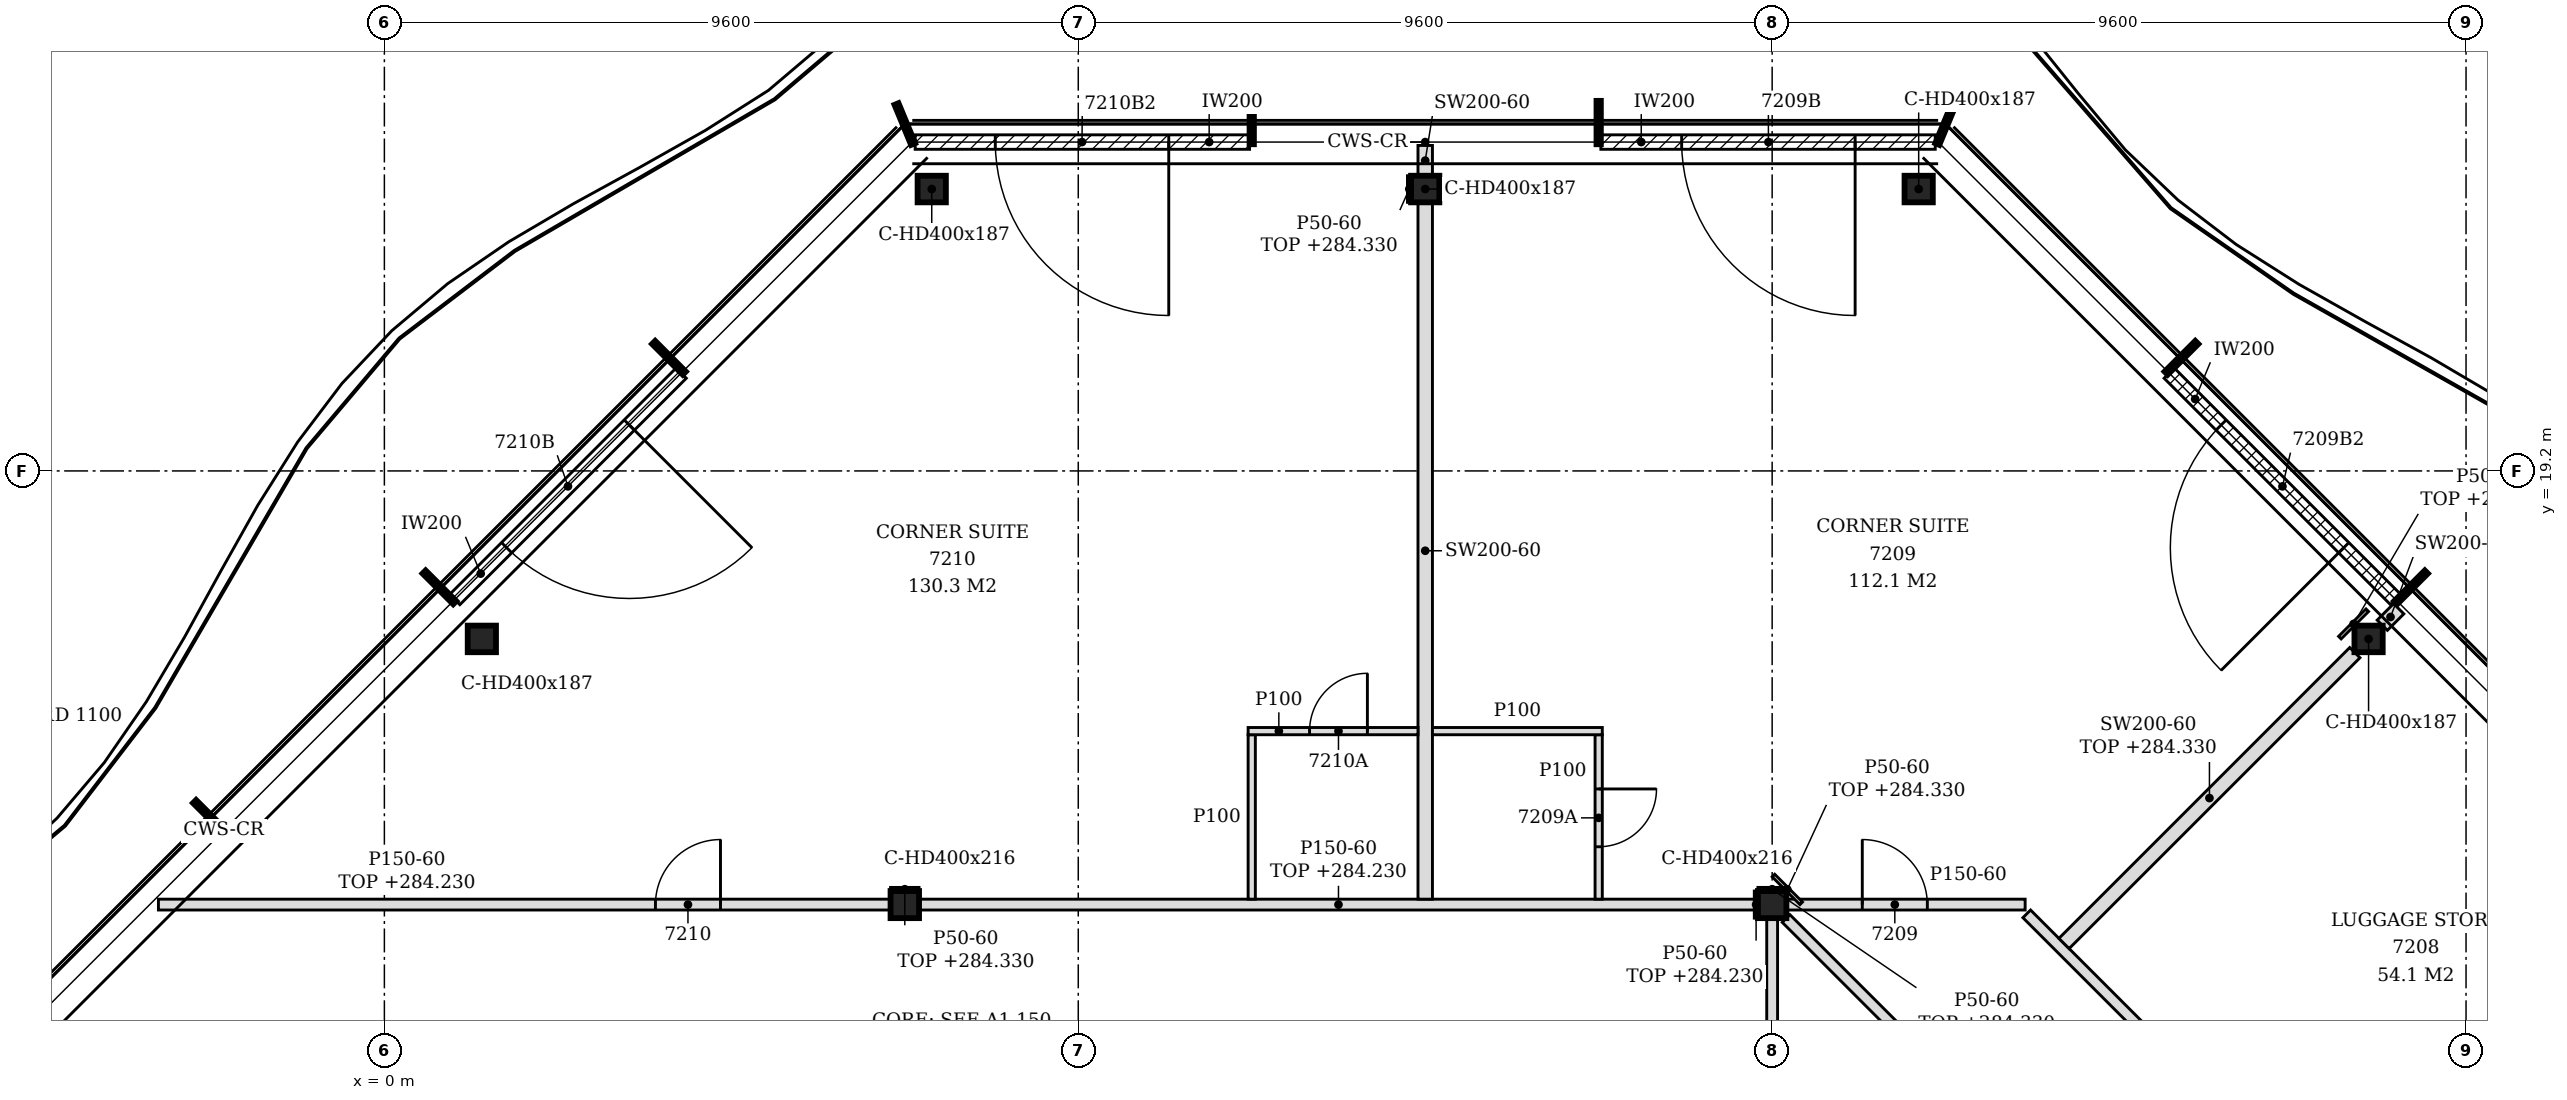
"""IFC4 building model, lengths in metres.
Left out: names, types, materials, properties, quantities, classifications, styles, units other than length and angle.
Written with IfcOpenShell. Run it as: python <this file> out.ifc"""

import sys

from ifc_helpers import new_model, si_unit, direction, frame, frame_2d, origin, origin_2d, place, context, subcontext, project, spatial, polyline, rectangle, i_section, outline, extrude, element, fill, save


model = new_model("IFC4")
c1 = context("Model", 3, precision=1e-05, world=origin(), true_north=direction((0.0, 1.0)))
c2 = subcontext(c1, "Body", "Model", "MODEL_VIEW")
j1 = project(units=[si_unit("LENGTHUNIT", "METRE"), si_unit("PLANEANGLEUNIT", "RADIAN")], contexts=[c1])
p1 = place(None, origin())
s1 = spatial("IfcSite", under=j1, at=p1, CompositionType="ELEMENT")
p2 = place(p1, origin())
s2 = spatial("IfcBuilding", under=s1, at=p2, CompositionType="ELEMENT")
p3 = place(p2, frame((0.0, 0.0, 281.4)))
s3 = spatial("IfcBuildingStorey", under=s2, at=p3, CompositionType="ELEMENT", Elevation=281.4)
for number, where, z_axis, x_axis in (
    (1, (27.451, 16.876, -0.15), (0.0, 0.0, 1.0), (1.0, 0.0, 0.0)),
    (2, (21.227, 23.1, -0.15), (0.0, 0.0, 1.0), (1.0, 0.0, 0.0)),
    (3, (14.4, 23.1, -0.15), (0.0, 0.0, 1.0), (1.0, 0.0, 0.0)),
    (4, (7.573, 23.1, -0.15), (0.0, 0.0, 1.0), (1.0, 0.0, 0.0)),
    (5, (1.348, 16.876, -0.15), (0.0, 0.0, 1.0), (1.0, 0.0, 0.0)),
):
    element("IfcColumn", number, at=place(p3, frame(where, z_axis=z_axis, x_axis=x_axis)), inside=s3, PredefinedType="COLUMN", context=c2, shape_type="SweptSolid", body=[
        extrude(i_section(OverallWidth=0.391, OverallDepth=0.368, WebThickness=0.015, FlangeThickness=0.024, FilletRadius=0.015, at=origin_2d()), origin(), (0.0, 0.0, 1.0), 3.6),
    ])
for number, where, z_axis, x_axis in (
    (6, (7.2, 13.2, -0.15), (0.0, 0.0, 1.0), (1.0, 0.0, 0.0)),
    (7, (19.2, 13.2, -0.15), (0.0, 0.0, 1.0), (1.0, 0.0, 0.0)),
):
    element("IfcColumn", number, at=place(p3, frame(where, z_axis=z_axis, x_axis=x_axis)), inside=s3, PredefinedType="COLUMN", context=c2, shape_type="SweptSolid", body=[
        extrude(i_section(OverallWidth=0.394, OverallDepth=0.375, WebThickness=0.017, FlangeThickness=0.028, FilletRadius=0.015, at=origin_2d()), origin(), (0.0, 0.0, 1.0), 3.6),
    ])
p4 = place(p3, frame((27.826, 17.42, 0.0), z_axis=(0.0, 0.0, 1.0), x_axis=(-0.707079231393, 0.707134329907, 0.0)))
e8 = element("IfcWall", 8, at=p4, inside=s3, PredefinedType="NOTDEFINED", context=c2, shape_type="SweptSolid", body=[
    extrude(rectangle(XDim=4.431, YDim=0.2, at=frame_2d((2.215, 0.0))), origin(), (0.0, 0.0, 1.0), 3.45),
])
p5 = place(p4, frame((1.015, 0.0, 0.0)))
e9 = element("IfcOpeningElement", 9, at=p5, cuts=e8, PredefinedType="OPENING", context=c2, shape_type="SweptSolid", body=[
    extrude(rectangle(XDim=2.4, YDim=2.4, at=frame_2d((1.2, 1.2))), frame((0.0, 0.11, 0.0), z_axis=(0.0, -1.0, 0.0), x_axis=(1.0, 0.0, 0.0)), (0.0, 0.0, 1.0), 0.22),
])
p6 = place(p3, frame((21.457, 23.75, 0.0), z_axis=(0.0, 0.0, 1.0), x_axis=(-1.0, 0.0, 0.0)))
e10 = element("IfcWall", 10, at=p6, inside=s3, PredefinedType="NOTDEFINED", context=c2, shape_type="SweptSolid", body=[
    extrude(rectangle(XDim=4.626, YDim=0.2, at=frame_2d((2.313, 0.0))), origin(), (0.0, 0.0, 1.0), 3.45),
])
p7 = place(p6, frame((1.108, 0.0, 0.0)))
e11 = element("IfcOpeningElement", 11, at=p7, cuts=e10, PredefinedType="OPENING", context=c2, shape_type="SweptSolid", body=[
    extrude(rectangle(XDim=2.4, YDim=2.4, at=frame_2d((1.2, 1.2))), frame((0.0, 0.11, 0.0), z_axis=(0.0, -1.0, 0.0), x_axis=(1.0, 0.0, 0.0)), (0.0, 0.0, 1.0), 0.22),
])
p8 = place(p3, frame((11.97, 23.75, 0.0), z_axis=(0.0, 0.0, 1.0), x_axis=(-1.0, 0.0, 0.0)))
e12 = element("IfcWall", 12, at=p8, inside=s3, PredefinedType="NOTDEFINED", context=c2, shape_type="SweptSolid", body=[
    extrude(rectangle(XDim=4.626, YDim=0.2, at=frame_2d((2.313, 0.0))), origin(), (0.0, 0.0, 1.0), 3.45),
])
p9 = place(p8, frame((1.118, 0.0, 0.0)))
e13 = element("IfcOpeningElement", 13, at=p9, cuts=e12, PredefinedType="OPENING", context=c2, shape_type="SweptSolid", body=[
    extrude(rectangle(XDim=2.4, YDim=2.4, at=frame_2d((1.2, 1.2))), frame((0.0, 0.11, 0.0), z_axis=(0.0, -1.0, 0.0), x_axis=(1.0, 0.0, 0.0)), (0.0, 0.0, 1.0), 0.22),
])
p10 = place(p3, frame((4.107, 20.553, 0.0), z_axis=(0.0, 0.0, 1.0), x_axis=(-0.707079231393, -0.707134329907, 0.0)))
e14 = element("IfcWall", 14, at=p10, inside=s3, PredefinedType="NOTDEFINED", context=c2, shape_type="SweptSolid", body=[
    extrude(rectangle(XDim=4.431, YDim=0.2, at=frame_2d((2.215, 0.0))), origin(), (0.0, 0.0, 1.0), 3.45),
])
p11 = place(p10, frame((1.015, 0.0, 0.0)))
e15 = element("IfcOpeningElement", 15, at=p11, cuts=e14, PredefinedType="OPENING", context=c2, shape_type="SweptSolid", body=[
    extrude(rectangle(XDim=2.4, YDim=2.4, at=frame_2d((1.2, 1.2))), frame((0.0, 0.11, 0.0), z_axis=(0.0, -1.0, 0.0), x_axis=(1.0, 0.0, 0.0)), (0.0, 0.0, 1.0), 0.22),
])
p12 = place(p3, frame((33.359, 2.435, 0.0), z_axis=(0.0, 0.0, 1.0), x_axis=(-0.707098666068, 0.707114896212, 0.0)))
e16 = element("IfcWall", 16, at=p12, inside=s3, PredefinedType="PARTITIONING", context=c2, shape_type="SweptSolid", body=[
    extrude(rectangle(XDim=15.042, YDim=0.15, at=frame_2d((7.521, 0.0))), origin(), (0.0, 0.0, 1.0), 2.88),
])
p13 = place(p12, frame((4.021, 0.0, 0.0)))
e17 = element("IfcOpeningElement", 17, at=p13, cuts=e16, PredefinedType="OPENING", context=c2, shape_type="SweptSolid", body=[
    extrude(rectangle(XDim=0.9, YDim=2.1, at=frame_2d((0.45, 1.05))), frame((0.0, 0.085, 0.0), z_axis=(0.0, -1.0, 0.0), x_axis=(1.0, 0.0, 0.0)), (0.0, 0.0, 1.0), 0.17),
])
p14 = place(p12, frame((10.04, 0.0, 0.0)))
e18 = element("IfcOpeningElement", 18, at=p14, cuts=e16, PredefinedType="OPENING", context=c2, shape_type="SweptSolid", body=[
    extrude(rectangle(XDim=0.9, YDim=2.1, at=frame_2d((0.45, 1.05))), frame((0.0, 0.085, 0.0), z_axis=(0.0, -1.0, 0.0), x_axis=(1.0, 0.0, 0.0)), (0.0, 0.0, 1.0), 0.17),
])
p15 = place(p3, frame((19.2, 3.675, 0.0), z_axis=(0.0, 0.0, 1.0), x_axis=(0.0, 1.0, 0.0)))
e19 = element("IfcWall", 19, at=p15, inside=s3, PredefinedType="PARTITIONING", context=c2, shape_type="SweptSolid", body=[
    extrude(rectangle(XDim=9.337, YDim=0.15, at=frame_2d((4.669, 0.0))), origin(), (0.0, 0.0, 1.0), 2.83),
])
p16 = place(p3, frame((28.672, 3.728, 0.0), z_axis=(0.0, 0.0, 1.0), x_axis=(-0.707106781187, 0.707106781187, 0.0)))
e20 = element("IfcWall", 20, at=p16, inside=s3, PredefinedType="PARTITIONING", context=c2, shape_type="SweptSolid", body=[
    extrude(rectangle(XDim=13.124, YDim=0.15, at=frame_2d((6.562, 0.0))), origin(), (0.0, 0.0, 1.0), 2.88),
])
p17 = place(p16, frame((6.157, 0.0, 0.0)))
e21 = element("IfcOpeningElement", 21, at=p17, cuts=e20, PredefinedType="OPENING", context=c2, shape_type="SweptSolid", body=[
    extrude(rectangle(XDim=0.9, YDim=2.1, at=frame_2d((0.45, 1.05))), frame((0.0, 0.085, 0.0), z_axis=(0.0, -1.0, 0.0), x_axis=(1.0, 0.0, 0.0)), (0.0, 0.0, 1.0), 0.17),
])
p18 = place(p3, frame((23.238, 12.662, 0.0), z_axis=(0.0, 0.0, 1.0), x_axis=(0.707106781187, 0.707106781187, 0.0)))
e22 = element("IfcWall", 22, at=p18, inside=s3, PredefinedType="PARTITIONING", context=c2, shape_type="SweptSolid", body=[
    extrude(rectangle(XDim=5.69, YDim=0.2, at=frame_2d((2.845, 0.0))), origin(), (0.0, 0.0, 1.0), 2.93),
])
p19 = place(p3, frame((-3.126, 13.2, 0.0), z_axis=(0.0, 0.0, 1.0), x_axis=(1.0, 0.0, 0.0)))
e23 = element("IfcWall", 23, at=p19, inside=s3, PredefinedType="PARTITIONING", context=c2, shape_type="SweptSolid", body=[
    extrude(outline(polyline([(0.0, 0.0), (10.129, 0.0), (10.129, 2.83), (1.369, 2.83), (1.367, 2.63), (0.229, 2.63), (0.227, 2.83), (0.0, 2.83), (0.0, 0.0)])), frame((0.0, 0.075, 0.0), z_axis=(0.0, -1.0, 0.0), x_axis=(1.0, 0.0, 0.0)), (0.0, 0.0, 1.0), 0.15),
])
p20 = place(p19, frame((6.876, 0.0, 0.0)))
e24 = element("IfcOpeningElement", 24, at=p20, cuts=e23, PredefinedType="OPENING", context=c2, shape_type="SweptSolid", body=[
    extrude(rectangle(XDim=0.9, YDim=2.1, at=frame_2d((0.45, 1.05))), frame((0.0, 0.085, 0.0), z_axis=(0.0, -1.0, 0.0), x_axis=(1.0, 0.0, 0.0)), (0.0, 0.0, 1.0), 0.17),
])
p21 = place(p3, frame((7.397, 13.2, 0.0), z_axis=(0.0, 0.0, 1.0), x_axis=(1.0, 0.0, 0.0)))
e25 = element("IfcWall", 25, at=p21, inside=s3, PredefinedType="PARTITIONING", context=c2, shape_type="SweptSolid", body=[
    extrude(rectangle(XDim=11.606, YDim=0.15, at=frame_2d((5.803, 0.0))), origin(), (0.0, 0.0, 1.0), 2.83),
])
p22 = place(p3, frame((19.397, 13.2, 0.0), z_axis=(0.0, 0.0, 1.0), x_axis=(1.0, 0.0, 0.0)))
e26 = element("IfcWall", 26, at=p22, inside=s3, PredefinedType="PARTITIONING", context=c2, shape_type="SweptSolid", body=[
    extrude(rectangle(XDim=3.303, YDim=0.15, at=frame_2d((1.652, 0.0))), origin(), (0.0, 0.0, 1.0), 3.45),
])
p23 = place(p22, frame((1.05, 0.0, 0.0)))
e27 = element("IfcOpeningElement", 27, at=p23, cuts=e26, PredefinedType="OPENING", context=c2, shape_type="SweptSolid", body=[
    extrude(rectangle(XDim=0.9, YDim=2.1, at=frame_2d((0.45, 1.05))), frame((0.0, 0.085, 0.0), z_axis=(0.0, -1.0, 0.0), x_axis=(1.0, 0.0, 0.0)), (0.0, 0.0, 1.0), 0.17),
])
p24 = place(p3, frame((12.0, 13.275, 0.0), z_axis=(0.0, 0.0, 1.0), x_axis=(0.0, 1.0, 0.0)))
e28 = element("IfcWall", 28, at=p24, inside=s3, PredefinedType="PARTITIONING", context=c2, shape_type="SweptSolid", body=[
    extrude(outline(polyline([(0.0, 0.0), (2.275, 0.0), (2.275, 3.45), (0.075, 3.45), (0.073, 2.83), (0.0, 2.83), (0.0, 0.0)])), frame((0.0, 0.05, 0.0), z_axis=(0.0, -1.0, 0.0), x_axis=(1.0, 0.0, 0.0)), (0.0, 0.0, 1.0), 0.1),
])
p25 = place(p3, frame((14.4, 13.275, 0.0), z_axis=(0.0, 0.0, 1.0), x_axis=(0.0, 1.0, 0.0)))
e29 = element("IfcWall", 29, at=p25, inside=s3, PredefinedType="PARTITIONING", context=c2, shape_type="SweptSolid", body=[
    extrude(outline(polyline([(0.0, 0.0), (9.641, 0.0), (9.641, 3.45), (6.03, 3.45), (6.028, 2.88), (5.82, 2.88), (5.818, 3.45), (0.075, 3.45), (0.073, 2.83), (0.0, 2.83), (0.0, 0.0)])), frame((0.0, 0.1, 0.0), z_axis=(0.0, -1.0, 0.0), x_axis=(1.0, 0.0, 0.0)), (0.0, 0.0, 1.0), 0.2),
])
p26 = place(p3, frame((16.8, 13.275, 0.0), z_axis=(0.0, 0.0, 1.0), x_axis=(0.0, 1.0, 0.0)))
e30 = element("IfcWall", 30, at=p26, inside=s3, PredefinedType="PARTITIONING", context=c2, shape_type="SweptSolid", body=[
    extrude(outline(polyline([(0.0, 0.0), (2.275, 0.0), (2.275, 3.45), (0.075, 3.45), (0.073, 2.83), (0.0, 2.83), (0.0, 0.0)])), frame((0.0, 0.05, 0.0), z_axis=(0.0, -1.0, 0.0), x_axis=(1.0, 0.0, 0.0)), (0.0, 0.0, 1.0), 0.1),
])
p27 = place(p26, frame((0.725, 0.0, 0.0)))
e31 = element("IfcOpeningElement", 31, at=p27, cuts=e30, PredefinedType="OPENING", context=c2, shape_type="SweptSolid", body=[
    extrude(rectangle(XDim=0.8, YDim=2.1, at=frame_2d((0.4, 1.05))), frame((0.0, 0.06, 0.0), z_axis=(0.0, -1.0, 0.0), x_axis=(1.0, 0.0, 0.0)), (0.0, 0.0, 1.0), 0.12),
])
p28 = place(p3, frame((11.95, 15.6, 0.0), z_axis=(0.0, 0.0, 1.0), x_axis=(1.0, 0.0, 0.0)))
e32 = element("IfcWall", 32, at=p28, inside=s3, PredefinedType="PARTITIONING", context=c2, shape_type="SweptSolid", body=[
    extrude(rectangle(XDim=2.35, YDim=0.1, at=frame_2d((1.175, 0.0))), origin(), (0.0, 0.0, 1.0), 3.45),
])
p29 = place(p28, frame((0.85, 0.0, 0.0)))
e33 = element("IfcOpeningElement", 33, at=p29, cuts=e32, PredefinedType="OPENING", context=c2, shape_type="SweptSolid", body=[
    extrude(rectangle(XDim=0.8, YDim=2.1, at=frame_2d((0.4, 1.05))), frame((0.0, 0.06, 0.0), z_axis=(0.0, -1.0, 0.0), x_axis=(1.0, 0.0, 0.0)), (0.0, 0.0, 1.0), 0.12),
])
p30 = place(p3, frame((14.5, 15.6, 0.0), z_axis=(0.0, 0.0, 1.0), x_axis=(1.0, 0.0, 0.0)))
e34 = element("IfcWall", 34, at=p30, inside=s3, PredefinedType="PARTITIONING", context=c2, shape_type="SweptSolid", body=[
    extrude(rectangle(XDim=2.35, YDim=0.1, at=frame_2d((1.175, 0.0))), origin(), (0.0, 0.0, 1.0), 3.45),
])
p31 = place(p3, frame((27.641, 17.065, 0.0), z_axis=(0.0, 0.0, 1.0), x_axis=(0.707106781187, 0.707106781187, 0.0)))
e35 = element("IfcWall", 35, at=p31, inside=s3, PredefinedType="PARTITIONING", context=c2, shape_type="SweptSolid", body=[
    extrude(rectangle(XDim=0.322, YDim=0.2, at=frame_2d((0.161, 0.0))), origin(), (0.0, 0.0, 1.0), 3.45),
])
p32 = place(p3, frame((14.4, 23.284, 0.0), z_axis=(0.0, 0.0, 1.0), x_axis=(0.0, 1.0, 0.0)))
e36 = element("IfcWall", 36, at=p32, inside=s3, PredefinedType="PARTITIONING", context=c2, shape_type="SweptSolid", body=[
    extrude(rectangle(XDim=0.419, YDim=0.2, at=frame_2d((0.209, 0.0))), origin(), (0.0, 0.0, 1.0), 3.45),
])
p33 = place(p3, frame((18.978, 13.012, 0.0), z_axis=(0.0, 0.0, 1.0), x_axis=(0.0, 1.0, 0.0)))
e37 = element("IfcWall", 37, at=p33, inside=s3, PredefinedType="PARTITIONING", context=c2, shape_type="SweptSolid", body=[
    extrude(rectangle(XDim=0.375, YDim=0.05, at=frame_2d((0.188, 0.0))), origin(), (0.0, 0.0, 1.0), 2.83),
])
p34 = place(p3, frame((19.602, 13.218, 0.0), z_axis=(0.0, 0.0, 1.0), x_axis=(-0.707106781187, 0.707106781187, 0.0)))
e38 = element("IfcWall", 38, at=p34, inside=s3, PredefinedType="PARTITIONING", context=c2, shape_type="SweptSolid", body=[
    extrude(rectangle(XDim=0.544, YDim=0.05, at=frame_2d((0.272, 0.0))), origin(), (0.0, 0.0, 1.0), 2.93),
])
p35 = place(p3, frame((27.054, 16.893, 0.0), z_axis=(0.0, 0.0, 1.0), x_axis=(0.707106781187, 0.707106781187, 0.0)))
e39 = element("IfcWall", 39, at=p35, inside=s3, PredefinedType="PARTITIONING", context=c2, shape_type="SweptSolid", body=[
    extrude(rectangle(XDim=0.537, YDim=0.05, at=frame_2d((0.269, 0.0))), origin(), (0.0, 0.0, 1.0), 2.93),
])
for number, where, z_axis, x_axis in (
    (40, (7.003, 13.413, 0.0), (0.0, 0.0, 1.0), (1.0, 0.0, 0.0)),
    (41, (19.003, 13.413, 0.0), (0.0, 0.0, 1.0), (1.0, 0.0, 0.0)),
):
    element("IfcWall", number, at=place(p3, frame(where, z_axis=z_axis, x_axis=x_axis)), inside=s3, PredefinedType="PARTITIONING", context=c2, shape_type="SweptSolid", body=[
        extrude(rectangle(XDim=0.394, YDim=0.05, at=frame_2d((0.197, 0.0))), origin(), (0.0, 0.0, 1.0), 2.93),
    ])
p36 = place(p3, frame((14.179, 22.916, 0.0), z_axis=(0.0, 0.0, 1.0), x_axis=(0.0, 1.0, 0.0)))
e42 = element("IfcWall", 42, at=p36, inside=s3, PredefinedType="PARTITIONING", context=c2, shape_type="SweptSolid", body=[
    extrude(rectangle(XDim=0.368, YDim=0.05, at=frame_2d((0.184, 0.0))), origin(), (0.0, 0.0, 1.0), 2.93),
])
p37 = place(p5, origin())
e43 = element("IfcDoor", 43, at=p37, inside=s3, OperationType="SINGLE_SWING_LEFT", PredefinedType="DOOR", context=c2, shape_type="SweptSolid", body=[
    extrude(rectangle(XDim=2.4, YDim=2.4, at=frame_2d((1.2, 1.2))), frame((0.0, 0.025, 0.0), z_axis=(0.0, -1.0, 0.0), x_axis=(1.0, 0.0, 0.0)), (0.0, 0.0, 1.0), 0.05),
])
fill(e9, e43)
p38 = place(p7, origin())
e44 = element("IfcDoor", 44, at=p38, inside=s3, OperationType="SINGLE_SWING_LEFT", PredefinedType="DOOR", context=c2, shape_type="SweptSolid", body=[
    extrude(rectangle(XDim=2.4, YDim=2.4, at=frame_2d((1.2, 1.2))), frame((0.0, 0.025, 0.0), z_axis=(0.0, -1.0, 0.0), x_axis=(1.0, 0.0, 0.0)), (0.0, 0.0, 1.0), 0.05),
])
fill(e11, e44)
p39 = place(p9, origin())
e45 = element("IfcDoor", 45, at=p39, inside=s3, OperationType="SINGLE_SWING_LEFT", PredefinedType="DOOR", context=c2, shape_type="SweptSolid", body=[
    extrude(rectangle(XDim=2.4, YDim=2.4, at=frame_2d((1.2, 1.2))), frame((0.0, 0.025, 0.0), z_axis=(0.0, -1.0, 0.0), x_axis=(1.0, 0.0, 0.0)), (0.0, 0.0, 1.0), 0.05),
])
fill(e13, e45)
p40 = place(p11, origin())
e46 = element("IfcDoor", 46, at=p40, inside=s3, OperationType="SINGLE_SWING_LEFT", PredefinedType="DOOR", context=c2, shape_type="SweptSolid", body=[
    extrude(rectangle(XDim=2.4, YDim=2.4, at=frame_2d((1.2, 1.2))), frame((0.0, 0.025, 0.0), z_axis=(0.0, -1.0, 0.0), x_axis=(1.0, 0.0, 0.0)), (0.0, 0.0, 1.0), 0.05),
])
fill(e15, e46)
p41 = place(p23, origin())
e47 = element("IfcDoor", 47, at=p41, inside=s3, OperationType="SINGLE_SWING_LEFT", PredefinedType="DOOR", context=c2, shape_type="SweptSolid", body=[
    extrude(rectangle(XDim=0.9, YDim=2.1, at=frame_2d((0.45, 1.05))), frame((0.0, 0.025, 0.0), z_axis=(0.0, -1.0, 0.0), x_axis=(1.0, 0.0, 0.0)), (0.0, 0.0, 1.0), 0.05),
])
fill(e27, e47)
p42 = place(p27, frame((0.8, 0.0, 0.0), z_axis=(0.0, 0.0, 1.0), x_axis=(-1.0, 0.0, 0.0)))
e48 = element("IfcDoor", 48, at=p42, inside=s3, OperationType="SINGLE_SWING_LEFT", PredefinedType="DOOR", context=c2, shape_type="SweptSolid", body=[
    extrude(rectangle(XDim=0.8, YDim=2.1, at=frame_2d((0.4, 1.05))), frame((0.0, 0.025, 0.0), z_axis=(0.0, -1.0, 0.0), x_axis=(1.0, 0.0, 0.0)), (0.0, 0.0, 1.0), 0.05),
])
fill(e31, e48)
p43 = place(p20, origin())
e49 = element("IfcDoor", 49, at=p43, inside=s3, OperationType="SINGLE_SWING_RIGHT", PredefinedType="DOOR", context=c2, shape_type="SweptSolid", body=[
    extrude(rectangle(XDim=0.9, YDim=2.1, at=frame_2d((0.45, 1.05))), frame((0.0, 0.025, 0.0), z_axis=(0.0, -1.0, 0.0), x_axis=(1.0, 0.0, 0.0)), (0.0, 0.0, 1.0), 0.05),
])
fill(e24, e49)
p44 = place(p29, origin())
e50 = element("IfcDoor", 50, at=p44, inside=s3, OperationType="SINGLE_SWING_RIGHT", PredefinedType="DOOR", context=c2, shape_type="SweptSolid", body=[
    extrude(rectangle(XDim=0.8, YDim=2.1, at=frame_2d((0.4, 1.05))), frame((0.0, 0.025, 0.0), z_axis=(0.0, -1.0, 0.0), x_axis=(1.0, 0.0, 0.0)), (0.0, 0.0, 1.0), 0.05),
])
fill(e33, e50)
save(model, sys.argv[1])
